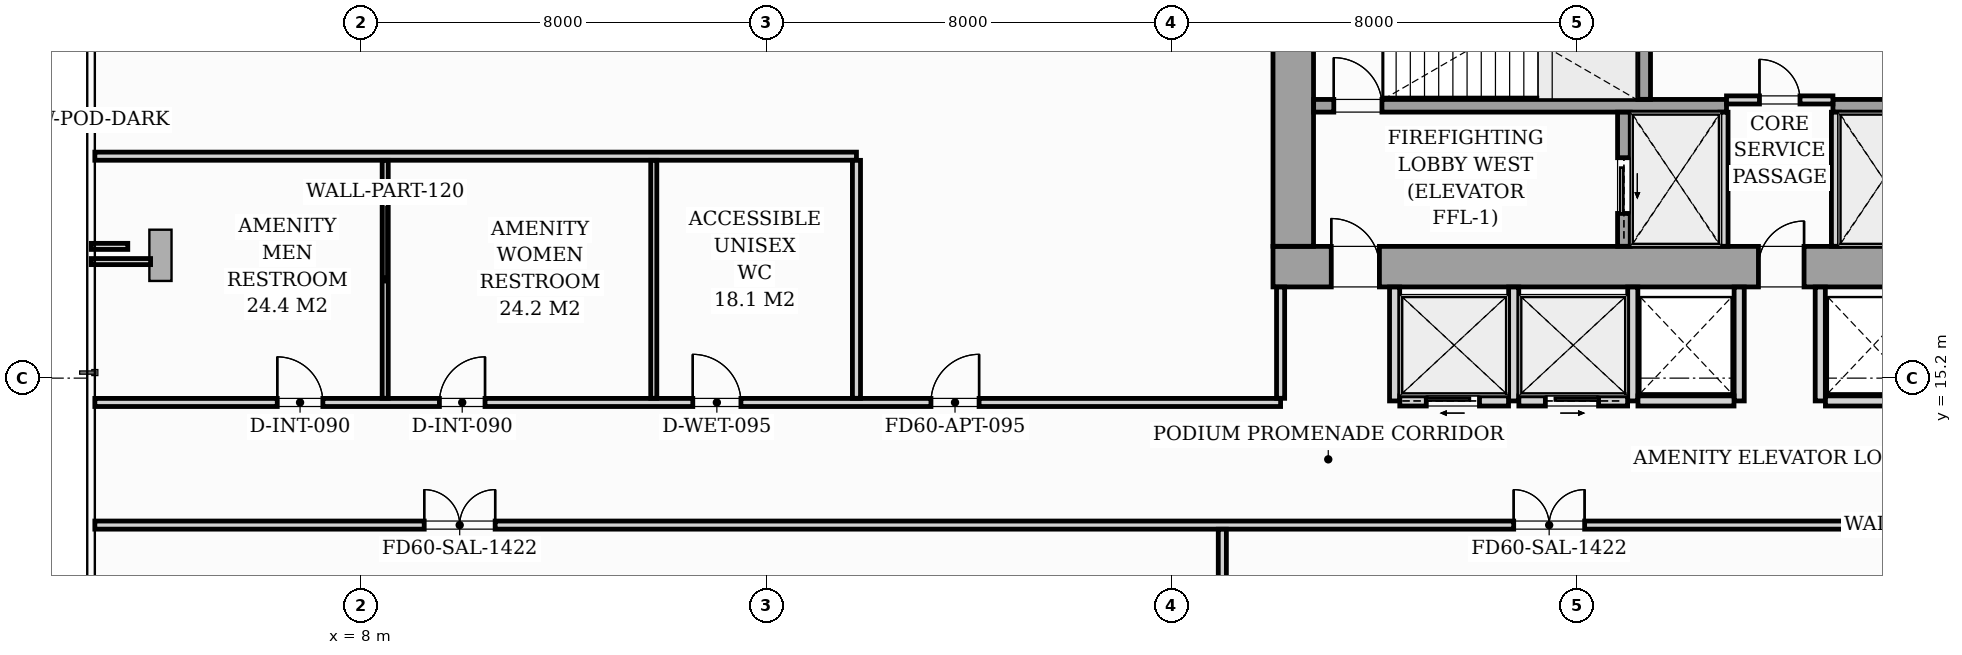
"""IFC4 building model, lengths in metres.
Left out: names, types, materials, properties, quantities, classifications, styles, units other than length and angle.
Written with IfcOpenShell. Run it as: python <this file> out.ifc"""

import sys

from ifc_helpers import new_model, si_unit, direction, frame, frame_2d, origin, origin_2d, place, context, subcontext, project, spatial, rectangle, i_section, extrude, source, transform, mapped, element, fill, save


model = new_model("IFC4")
c1 = context("Model", 3, precision=1e-05, world=origin(), true_north=direction((0.0, 1.0)))
c2 = subcontext(c1, "Body", "Model", "MODEL_VIEW")
j1 = project(units=[si_unit("LENGTHUNIT", "METRE"), si_unit("PLANEANGLEUNIT", "RADIAN")], contexts=[c1])
p1 = place(None, origin())
s1 = spatial("IfcSite", under=j1, at=p1, CompositionType="ELEMENT")
p2 = place(p1, origin())
s2 = spatial("IfcBuilding", under=s1, at=p2, CompositionType="ELEMENT")
p3 = place(p2, frame((0.0, 0.0, 9.5)))
s3 = spatial("IfcBuildingStorey", under=s2, at=p3, CompositionType="ELEMENT", Elevation=9.5)
m1 = source(origin(), c2, "Body", "SweptSolid", [
    extrude(i_section(OverallWidth=0.437, OverallDepth=0.514, WebThickness=0.061, FlangeThickness=0.097, FilletRadius=0.018, at=origin_2d()), origin(), (0.0, 0.0, 1.0), 4.496),
])
for number, where, z_axis, x_axis in (
    (1, (26.4, 17.4, 0.002), (0.0, 0.0, 1.0), (1.0, 0.0, 0.0)),
    (2, (33.12, 17.4, 0.002), (0.0, 0.0, 1.0), (1.0, 0.0, 0.0)),
):
    element("IfcColumn", number, at=place(p3, frame(where, z_axis=z_axis, x_axis=x_axis)), inside=s3, PredefinedType="PILASTER", context=c2, shape_type="MappedRepresentation", body=[
        mapped(m1, transform((0.0, 0.0, 0.0), scale=1.0)),
    ])
m2 = source(origin(), c2, "Body", "SweptSolid", [
    extrude(i_section(OverallWidth=0.438, OverallDepth=1.011, WebThickness=0.041, FlangeThickness=0.074, FilletRadius=0.024, at=origin_2d()), origin(), (0.0, 0.0, 1.0), 4.08),
])
p4 = place(p3, frame((3.795, 17.79, 0.068), z_axis=(0.213256785591, -0.142171190394, 0.966596552871), x_axis=(-0.804256946322, 0.536171297548, 0.256302758429)))
e3 = element("IfcColumn", 3, at=p4, inside=s3, PredefinedType="COLUMN", context=c2, shape_type="MappedRepresentation", body=[
    mapped(m2, transform((0.0, 0.0, 0.0), scale=1.0)),
])
p5 = place(p3, frame((26.0, 17.4, 0.0), z_axis=(0.0, 0.0, 1.0), x_axis=(1.0, 0.0, 0.0)))
e4 = element("IfcWall", 4, at=p5, inside=s3, PredefinedType="SHEAR", context=c2, shape_type="SweptSolid", body=[
    extrude(rectangle(XDim=20.0, YDim=0.8, at=frame_2d((10.0, 0.0))), origin(), (0.0, 0.0, 1.0), 4.5),
])
p6 = place(p5, frame((1.15, 0.0, 0.0)))
e5 = element("IfcOpeningElement", 5, at=p6, cuts=e4, PredefinedType="OPENING", context=c2, shape_type="SweptSolid", body=[
    extrude(rectangle(XDim=0.95, YDim=2.06, at=frame_2d((0.475, 1.03))), frame((0.0, 0.41, 0.0), z_axis=(0.0, -1.0, 0.0), x_axis=(1.0, 0.0, 0.0)), (0.0, 0.0, 1.0), 0.82),
])
p7 = place(p5, frame((9.58, 0.0, 0.0)))
e6 = element("IfcOpeningElement", 6, at=p7, cuts=e4, PredefinedType="OPENING", context=c2, shape_type="SweptSolid", body=[
    extrude(rectangle(XDim=0.9, YDim=2.06, at=frame_2d((0.45, 1.03))), frame((0.0, 0.41, 0.0), z_axis=(0.0, -1.0, 0.0), x_axis=(1.0, 0.0, 0.0)), (0.0, 0.0, 1.0), 0.82),
])
p8 = place(p5, frame((17.75, 0.0, 0.0)))
e7 = element("IfcOpeningElement", 7, at=p8, cuts=e4, PredefinedType="OPENING", context=c2, shape_type="SweptSolid", body=[
    extrude(rectangle(XDim=0.95, YDim=2.06, at=frame_2d((0.475, 1.03))), frame((0.0, 0.41, 0.0), z_axis=(0.0, -1.0, 0.0), x_axis=(1.0, 0.0, 0.0)), (0.0, 0.0, 1.0), 0.82),
])
p9 = place(p3, frame((26.4, 17.802, 0.0), z_axis=(0.0, 0.0, 1.0), x_axis=(0.0, 1.0, 0.0)))
e8 = element("IfcWall", 8, at=p9, inside=s3, PredefinedType="SHEAR", context=c2, shape_type="SweptSolid", body=[
    extrude(rectangle(XDim=5.796, YDim=0.8, at=frame_2d((2.898, 0.0))), origin(), (0.0, 0.0, 1.0), 4.5),
])
p10 = place(p3, frame((26.802, 20.575, 0.0), z_axis=(0.0, 0.0, 1.0), x_axis=(1.0, 0.0, 0.0)))
e9 = element("IfcWall", 9, at=p10, inside=s3, PredefinedType="SOLIDWALL", context=c2, shape_type="SweptSolid", body=[
    extrude(rectangle(XDim=8.148, YDim=0.25, at=frame_2d((4.074, 0.0))), origin(), (0.0, 0.0, 1.0), 4.5),
])
p11 = place(p10, frame((0.398, 0.0, 0.0)))
e10 = element("IfcOpeningElement", 10, at=p11, cuts=e9, PredefinedType="OPENING", context=c2, shape_type="SweptSolid", body=[
    extrude(rectangle(XDim=0.95, YDim=2.06, at=frame_2d((0.475, 1.03))), frame((0.0, 0.135, 0.0), z_axis=(0.0, -1.0, 0.0), x_axis=(1.0, 0.0, 0.0)), (0.0, 0.0, 1.0), 0.27),
])
p12 = place(p3, frame((37.05, 20.575, 0.0), z_axis=(0.0, 0.0, 1.0), x_axis=(1.0, 0.0, 0.0)))
e11 = element("IfcWall", 11, at=p12, inside=s3, PredefinedType="SOLIDWALL", context=c2, shape_type="SweptSolid", body=[
    extrude(rectangle(XDim=8.148, YDim=0.25, at=frame_2d((4.074, 0.0))), origin(), (0.0, 0.0, 1.0), 4.5),
])
p13 = place(p12, frame((6.6, 0.0, 0.0)))
e12 = element("IfcOpeningElement", 12, at=p13, cuts=e11, PredefinedType="OPENING", context=c2, shape_type="SweptSolid", body=[
    extrude(rectangle(XDim=0.95, YDim=2.06, at=frame_2d((0.475, 1.03))), frame((0.0, 0.135, 0.0), z_axis=(0.0, -1.0, 0.0), x_axis=(1.0, 0.0, 0.0)), (0.0, 0.0, 1.0), 0.27),
])
p14 = place(p3, frame((33.325, 20.702, 0.0), z_axis=(0.0, 0.0, 1.0), x_axis=(0.0, 1.0, 0.0)))
e13 = element("IfcWall", 13, at=p14, inside=s3, PredefinedType="SOLIDWALL", context=c2, shape_type="SweptSolid", body=[
    extrude(rectangle(XDim=2.896, YDim=0.25, at=frame_2d((1.448, 0.0))), origin(), (0.0, 0.0, 1.0), 4.5),
])
p15 = place(p3, frame((32.925, 17.802, 0.0), z_axis=(0.0, 0.0, 1.0), x_axis=(0.0, 1.0, 0.0)))
e14 = element("IfcWall", 14, at=p15, inside=s3, PredefinedType="SOLIDWALL", context=c2, shape_type="SweptSolid", body=[
    extrude(rectangle(XDim=2.646, YDim=0.25, at=frame_2d((1.323, 0.0))), origin(), (0.0, 0.0, 1.0), 4.5),
])
p16 = place(p15, frame((0.648, 0.0, 0.0)))
e15 = element("IfcOpeningElement", 15, at=p16, cuts=e14, PredefinedType="OPENING", context=c2, shape_type="SweptSolid", body=[
    extrude(rectangle(XDim=1.1, YDim=2.08, at=frame_2d((0.55, 1.04))), frame((0.0, 0.135, 0.0), z_axis=(0.0, -1.0, 0.0), x_axis=(1.0, 0.0, 0.0)), (0.0, 0.0, 1.0), 0.27),
])
for number, where, z_axis, x_axis in (
    (16, (34.9, 17.802, 0.0), (0.0, 0.0, 1.0), (0.0, 1.0, 0.0)),
    (17, (37.1, 17.802, 0.0), (0.0, 0.0, 1.0), (0.0, 1.0, 0.0)),
):
    element("IfcWall", number, at=place(p3, frame(where, z_axis=z_axis, x_axis=x_axis)), inside=s3, PredefinedType="PARTITIONING", context=c2, shape_type="SweptSolid", body=[
        extrude(rectangle(XDim=2.646, YDim=0.16, at=frame_2d((1.323, 0.0))), origin(), (0.0, 0.0, 1.0), 4.08),
    ])
p17 = place(p3, frame((34.95, 20.69, 0.0), z_axis=(0.0, 0.0, 1.0), x_axis=(1.0, 0.0, 0.0)))
e18 = element("IfcWall", 18, at=p17, inside=s3, PredefinedType="PARTITIONING", context=c2, shape_type="SweptSolid", body=[
    extrude(rectangle(XDim=2.1, YDim=0.16, at=frame_2d((1.05, 0.0))), origin(), (0.0, 0.0, 1.0), 4.08),
])
p18 = place(p17, frame((0.65, 0.0, 0.0)))
e19 = element("IfcOpeningElement", 19, at=p18, cuts=e18, PredefinedType="OPENING", context=c2, shape_type="SweptSolid", body=[
    extrude(rectangle(XDim=0.8, YDim=2.05, at=frame_2d((0.4, 1.025))), frame((0.0, 0.09, 0.0), z_axis=(0.0, -1.0, 0.0), x_axis=(1.0, 0.0, 0.0)), (0.0, 0.0, 1.0), 0.18),
])
for number, where, z_axis, x_axis in (
    (20, (28.4, 14.75, 0.0), (0.0, 0.0, 1.0), (0.0, 1.0, 0.0)),
    (21, (30.75, 14.75, 0.0), (0.0, 0.0, 1.0), (0.0, 1.0, 0.0)),
    (22, (33.1, 14.75, 0.0), (0.0, 0.0, 1.0), (0.0, 1.0, 0.0)),
):
    element("IfcWall", number, at=place(p3, frame(where, z_axis=z_axis, x_axis=x_axis)), inside=s3, PredefinedType="PARTITIONING", context=c2, shape_type="SweptSolid", body=[
        extrude(rectangle(XDim=2.248, YDim=0.2, at=frame_2d((1.124, 0.0))), origin(), (0.0, 0.0, 1.0), 4.08),
    ])
p19 = place(p3, frame((28.502, 14.75, 0.0), z_axis=(0.0, 0.0, 1.0), x_axis=(1.0, 0.0, 0.0)))
e23 = element("IfcWall", 23, at=p19, inside=s3, PredefinedType="PARTITIONING", context=c2, shape_type="SweptSolid", body=[
    extrude(rectangle(XDim=2.146, YDim=0.2, at=frame_2d((1.073, 0.0))), origin(), (0.0, 0.0, 1.0), 4.08),
])
p20 = place(p19, frame((0.523, 0.0, 0.0)))
e24 = element("IfcOpeningElement", 24, at=p20, cuts=e23, PredefinedType="OPENING", context=c2, shape_type="SweptSolid", body=[
    extrude(rectangle(XDim=1.05, YDim=2.08, at=frame_2d((0.525, 1.04))), frame((0.0, 0.11, 0.0), z_axis=(0.0, -1.0, 0.0), x_axis=(1.0, 0.0, 0.0)), (0.0, 0.0, 1.0), 0.22),
])
p21 = place(p3, frame((30.852, 14.75, 0.0), z_axis=(0.0, 0.0, 1.0), x_axis=(1.0, 0.0, 0.0)))
e25 = element("IfcWall", 25, at=p21, inside=s3, PredefinedType="PARTITIONING", context=c2, shape_type="SweptSolid", body=[
    extrude(rectangle(XDim=2.146, YDim=0.2, at=frame_2d((1.073, 0.0))), origin(), (0.0, 0.0, 1.0), 4.08),
])
p22 = place(p21, frame((0.523, 0.0, 0.0)))
e26 = element("IfcOpeningElement", 26, at=p22, cuts=e25, PredefinedType="OPENING", context=c2, shape_type="SweptSolid", body=[
    extrude(rectangle(XDim=1.05, YDim=2.08, at=frame_2d((0.525, 1.04))), frame((0.0, 0.11, 0.0), z_axis=(0.0, -1.0, 0.0), x_axis=(1.0, 0.0, 0.0)), (0.0, 0.0, 1.0), 0.22),
])
p23 = place(p3, frame((35.2, 14.75, 0.0), z_axis=(0.0, 0.0, 1.0), x_axis=(0.0, 1.0, 0.0)))
e27 = element("IfcWall", 27, at=p23, inside=s3, PredefinedType="PARTITIONING", context=c2, shape_type="SweptSolid", body=[
    extrude(rectangle(XDim=2.248, YDim=0.2, at=frame_2d((1.124, 0.0))), origin(), (0.0, 0.0, 1.0), 4.08),
])
p24 = place(p3, frame((33.202, 14.75, 0.0), z_axis=(0.0, 0.0, 1.0), x_axis=(1.0, 0.0, 0.0)))
e28 = element("IfcWall", 28, at=p24, inside=s3, PredefinedType="PARTITIONING", context=c2, shape_type="SweptSolid", body=[
    extrude(rectangle(XDim=1.896, YDim=0.2, at=frame_2d((0.948, 0.0))), origin(), (0.0, 0.0, 1.0), 4.08),
])
p25 = place(p3, frame((36.8, 14.75, 0.0), z_axis=(0.0, 0.0, 1.0), x_axis=(0.0, 1.0, 0.0)))
e29 = element("IfcWall", 29, at=p25, inside=s3, PredefinedType="PARTITIONING", context=c2, shape_type="SweptSolid", body=[
    extrude(rectangle(XDim=2.248, YDim=0.2, at=frame_2d((1.124, 0.0))), origin(), (0.0, 0.0, 1.0), 4.08),
])
p26 = place(p3, frame((36.902, 14.75, 0.0), z_axis=(0.0, 0.0, 1.0), x_axis=(1.0, 0.0, 0.0)))
e30 = element("IfcWall", 30, at=p26, inside=s3, PredefinedType="PARTITIONING", context=c2, shape_type="SweptSolid", body=[
    extrude(rectangle(XDim=1.896, YDim=0.2, at=frame_2d((0.948, 0.0))), origin(), (0.0, 0.0, 1.0), 4.08),
])
p27 = place(p3, frame((2.75, 12.3, 0.0), z_axis=(0.0, 0.0, 1.0), x_axis=(1.0, 0.0, 0.0)))
e31 = element("IfcWall", 31, at=p27, inside=s3, PredefinedType="PARTITIONING", context=c2, shape_type="SweptSolid", body=[
    extrude(rectangle(XDim=72.348, YDim=0.16, at=frame_2d((36.174, 0.0))), origin(), (0.0, 0.0, 1.0), 4.08),
])
p28 = place(p27, frame((6.5, 0.0, 0.0)))
e32 = element("IfcOpeningElement", 32, at=p28, cuts=e31, PredefinedType="OPENING", context=c2, shape_type="SweptSolid", body=[
    extrude(rectangle(XDim=1.4, YDim=2.08, at=frame_2d((0.7, 1.04))), frame((0.0, 0.09, 0.0), z_axis=(0.0, -1.0, 0.0), x_axis=(1.0, 0.0, 0.0)), (0.0, 0.0, 1.0), 0.18),
])
p29 = place(p27, frame((28.0, 0.0, 0.0)))
e33 = element("IfcOpeningElement", 33, at=p29, cuts=e31, PredefinedType="OPENING", context=c2, shape_type="SweptSolid", body=[
    extrude(rectangle(XDim=1.4, YDim=2.08, at=frame_2d((0.7, 1.04))), frame((0.0, 0.09, 0.0), z_axis=(0.0, -1.0, 0.0), x_axis=(1.0, 0.0, 0.0)), (0.0, 0.0, 1.0), 0.18),
])
p30 = place(p3, frame((2.75, 14.72, 0.0), z_axis=(0.0, 0.0, 1.0), x_axis=(1.0, 0.0, 0.0)))
e34 = element("IfcWall", 34, at=p30, inside=s3, PredefinedType="PARTITIONING", context=c2, shape_type="SweptSolid", body=[
    extrude(rectangle(XDim=23.4, YDim=0.16, at=frame_2d((11.7, 0.0))), origin(), (0.0, 0.0, 1.0), 4.08),
])
p31 = place(p30, frame((16.5, 0.0, 0.0)))
e35 = element("IfcOpeningElement", 35, at=p31, cuts=e34, PredefinedType="OPENING", context=c2, shape_type="SweptSolid", body=[
    extrude(rectangle(XDim=0.95, YDim=2.06, at=frame_2d((0.475, 1.03))), frame((0.0, 0.09, 0.0), z_axis=(0.0, -1.0, 0.0), x_axis=(1.0, 0.0, 0.0)), (0.0, 0.0, 1.0), 0.18),
])
p32 = place(p30, frame((3.6, 0.0, 0.0)))
e36 = element("IfcOpeningElement", 36, at=p32, cuts=e34, PredefinedType="OPENING", context=c2, shape_type="SweptSolid", body=[
    extrude(rectangle(XDim=0.9, YDim=2.05, at=frame_2d((0.45, 1.025))), frame((0.0, 0.09, 0.0), z_axis=(0.0, -1.0, 0.0), x_axis=(1.0, 0.0, 0.0)), (0.0, 0.0, 1.0), 0.18),
])
p33 = place(p30, frame((6.8, 0.0, 0.0)))
e37 = element("IfcOpeningElement", 37, at=p33, cuts=e34, PredefinedType="OPENING", context=c2, shape_type="SweptSolid", body=[
    extrude(rectangle(XDim=0.9, YDim=2.05, at=frame_2d((0.45, 1.025))), frame((0.0, 0.09, 0.0), z_axis=(0.0, -1.0, 0.0), x_axis=(1.0, 0.0, 0.0)), (0.0, 0.0, 1.0), 0.18),
])
p34 = place(p30, frame((11.8, 0.0, 0.0)))
e38 = element("IfcOpeningElement", 38, at=p34, cuts=e34, PredefinedType="OPENING", context=c2, shape_type="SweptSolid", body=[
    extrude(rectangle(XDim=0.95, YDim=2.1, at=frame_2d((0.475, 1.05))), frame((0.0, 0.09, 0.0), z_axis=(0.0, -1.0, 0.0), x_axis=(1.0, 0.0, 0.0)), (0.0, 0.0, 1.0), 0.18),
])
p35 = place(p3, frame((25.0, 1.35, 0.0), z_axis=(0.0, 0.0, 1.0), x_axis=(0.0, 1.0, 0.0)))
e39 = element("IfcWall", 39, at=p35, inside=s3, PredefinedType="PARTITIONING", context=c2, shape_type="SweptSolid", body=[
    extrude(rectangle(XDim=10.868, YDim=0.16, at=frame_2d((5.434, 0.0))), origin(), (0.0, 0.0, 1.0), 4.08),
])
p36 = place(p3, frame((2.75, 19.58, 0.0), z_axis=(0.0, 0.0, 1.0), x_axis=(1.0, 0.0, 0.0)))
e40 = element("IfcWall", 40, at=p36, inside=s3, PredefinedType="PARTITIONING", context=c2, shape_type="SweptSolid", body=[
    extrude(rectangle(XDim=15.03, YDim=0.16, at=frame_2d((7.515, 0.0))), origin(), (0.0, 0.0, 1.0), 4.08),
])
for number, where, z_axis, x_axis in (
    (41, (8.48, 14.802, 0.0), (0.0, 0.0, 1.0), (0.0, 1.0, 0.0)),
    (42, (13.78, 14.802, 0.0), (0.0, 0.0, 1.0), (0.0, 1.0, 0.0)),
):
    element("IfcWall", number, at=place(p3, frame(where, z_axis=z_axis, x_axis=x_axis)), inside=s3, PredefinedType="PARTITIONING", context=c2, shape_type="SweptSolid", body=[
        extrude(rectangle(XDim=4.696, YDim=0.12, at=frame_2d((2.348, 0.0))), origin(), (0.0, 0.0, 1.0), 4.08),
    ])
p37 = place(p3, frame((17.78, 14.802, 0.0), z_axis=(0.0, 0.0, 1.0), x_axis=(0.0, 1.0, 0.0)))
e43 = element("IfcWall", 43, at=p37, inside=s3, PredefinedType="PARTITIONING", context=c2, shape_type="SweptSolid", body=[
    extrude(rectangle(XDim=4.696, YDim=0.16, at=frame_2d((2.348, 0.0))), origin(), (0.0, 0.0, 1.0), 4.08),
])
p38 = place(p3, frame((26.15, 14.802, 0.0), z_axis=(0.0, 0.0, 1.0), x_axis=(0.0, 1.0, 0.0)))
e44 = element("IfcWall", 44, at=p38, inside=s3, PredefinedType="PARTITIONING", context=c2, shape_type="SweptSolid", body=[
    extrude(rectangle(XDim=2.196, YDim=0.16, at=frame_2d((1.098, 0.0))), origin(), (0.0, 0.0, 1.0), 4.08),
])
p39 = place(p3, frame((3.85, 17.5, 0.0), z_axis=(0.0, 0.0, 1.0), x_axis=(-1.0, 0.0, 0.0)))
e45 = element("IfcWall", 45, at=p39, inside=s3, PredefinedType="PARTITIONING", context=c2, shape_type="SweptSolid", body=[
    extrude(rectangle(XDim=1.17, YDim=0.12, at=frame_2d((0.585, 0.0))), origin(), (0.0, 0.0, 1.0), 4.08),
])
p40 = place(p3, frame((3.4, 17.8, 0.0), z_axis=(0.0, 0.0, 1.0), x_axis=(-1.0, 0.0, 0.0)))
e46 = element("IfcWall", 46, at=p40, inside=s3, PredefinedType="PARTITIONING", context=c2, shape_type="SweptSolid", body=[
    extrude(rectangle(XDim=0.72, YDim=0.12, at=frame_2d((0.36, 0.0))), origin(), (0.0, 0.0, 1.0), 4.08),
])
m3 = source(origin(), c2, "Body", "SweptSolid", [
    extrude(rectangle(XDim=0.95, YDim=2.06, at=frame_2d((0.475, 1.03))), frame((0.0, 0.025, 0.0), z_axis=(0.0, -1.0, 0.0), x_axis=(1.0, 0.0, 0.0)), (0.0, 0.0, 1.0), 0.05),
])
p41 = place(p6, origin())
e47 = element("IfcDoor", 47, at=p41, inside=s3, OperationType="SINGLE_SWING_LEFT", PredefinedType="DOOR", context=c2, shape_type="MappedRepresentation", body=[
    mapped(m3, transform((0.0, 0.0, 0.0), scale=1.0)),
])
fill(e5, e47)
m4 = source(origin(), c2, "Body", "SweptSolid", [
    extrude(rectangle(XDim=0.9, YDim=2.06, at=frame_2d((0.45, 1.03))), frame((0.0, 0.025, 0.0), z_axis=(0.0, -1.0, 0.0), x_axis=(1.0, 0.0, 0.0)), (0.0, 0.0, 1.0), 0.05),
])
p42 = place(p7, origin())
e48 = element("IfcDoor", 48, at=p42, inside=s3, OperationType="SINGLE_SWING_RIGHT", PredefinedType="DOOR", context=c2, shape_type="MappedRepresentation", body=[
    mapped(m4, transform((0.0, 0.0, 0.0), scale=1.0)),
])
fill(e6, e48)
p43 = place(p11, origin())
e49 = element("IfcDoor", 49, at=p43, inside=s3, OperationType="SINGLE_SWING_LEFT", PredefinedType="DOOR", context=c2, shape_type="MappedRepresentation", body=[
    mapped(m3, transform((0.0, 0.0, 0.0), scale=1.0)),
])
fill(e10, e49)
m5 = source(origin(), c2, "Body", "SweptSolid", [
    extrude(rectangle(XDim=1.1, YDim=2.08, at=frame_2d((0.55, 1.04))), frame((0.0, 0.025, 0.0), z_axis=(0.0, -1.0, 0.0), x_axis=(1.0, 0.0, 0.0)), (0.0, 0.0, 1.0), 0.05),
])
p44 = place(p16, origin())
e50 = element("IfcDoor", 50, at=p44, inside=s3, OperationType="SLIDING_TO_LEFT", PredefinedType="DOOR", context=c2, shape_type="MappedRepresentation", body=[
    mapped(m5, transform((0.0, 0.0, 0.0), scale=1.0)),
])
fill(e15, e50)
m6 = source(origin(), c2, "Body", "SweptSolid", [
    extrude(rectangle(XDim=0.8, YDim=2.05, at=frame_2d((0.4, 1.025))), frame((0.0, 0.025, 0.0), z_axis=(0.0, -1.0, 0.0), x_axis=(1.0, 0.0, 0.0)), (0.0, 0.0, 1.0), 0.05),
])
p45 = place(p18, origin())
e51 = element("IfcDoor", 51, at=p45, inside=s3, OperationType="SINGLE_SWING_LEFT", PredefinedType="DOOR", context=c2, shape_type="MappedRepresentation", body=[
    mapped(m6, transform((0.0, 0.0, 0.0), scale=1.0)),
])
fill(e19, e51)
m7 = source(origin(), c2, "Body", "SweptSolid", [
    extrude(rectangle(XDim=1.05, YDim=2.08, at=frame_2d((0.525, 1.04))), frame((0.0, 0.025, 0.0), z_axis=(0.0, -1.0, 0.0), x_axis=(1.0, 0.0, 0.0)), (0.0, 0.0, 1.0), 0.05),
])
p46 = place(p20, origin())
e52 = element("IfcDoor", 52, at=p46, inside=s3, OperationType="SLIDING_TO_LEFT", PredefinedType="DOOR", context=c2, shape_type="MappedRepresentation", body=[
    mapped(m7, transform((0.0, 0.0, 0.0), scale=1.0)),
])
fill(e24, e52)
p47 = place(p22, origin())
e53 = element("IfcDoor", 53, at=p47, inside=s3, OperationType="SLIDING_TO_RIGHT", PredefinedType="DOOR", context=c2, shape_type="MappedRepresentation", body=[
    mapped(m7, transform((0.0, 0.0, 0.0), scale=1.0)),
])
fill(e26, e53)
m8 = source(origin(), c2, "Body", "SweptSolid", [
    extrude(rectangle(XDim=1.4, YDim=2.08, at=frame_2d((0.7, 1.04))), frame((0.0, 0.025, 0.0), z_axis=(0.0, -1.0, 0.0), x_axis=(1.0, 0.0, 0.0)), (0.0, 0.0, 1.0), 0.05),
])
p48 = place(p28, origin())
e54 = element("IfcDoor", 54, at=p48, inside=s3, OperationType="DOUBLE_DOOR_SINGLE_SWING", PredefinedType="DOOR", context=c2, shape_type="MappedRepresentation", body=[
    mapped(m8, transform((0.0, 0.0, 0.0), scale=1.0)),
])
fill(e32, e54)
p49 = place(p29, origin())
e55 = element("IfcDoor", 55, at=p49, inside=s3, OperationType="DOUBLE_DOOR_SINGLE_SWING", PredefinedType="DOOR", context=c2, shape_type="MappedRepresentation", body=[
    mapped(m8, transform((0.0, 0.0, 0.0), scale=1.0)),
])
fill(e33, e55)
m9 = source(origin(), c2, "Body", "SweptSolid", [
    extrude(rectangle(XDim=0.95, YDim=2.06, at=frame_2d((0.475, 1.03))), frame((0.0, 0.025, 0.0), z_axis=(0.0, -1.0, 0.0), x_axis=(1.0, 0.0, 0.0)), (0.0, 0.0, 1.0), 0.05),
])
p50 = place(p31, origin())
e56 = element("IfcDoor", 56, at=p50, inside=s3, OperationType="SINGLE_SWING_RIGHT", PredefinedType="DOOR", context=c2, shape_type="MappedRepresentation", body=[
    mapped(m9, transform((0.0, 0.0, 0.0), scale=1.0)),
])
fill(e35, e56)
m10 = source(origin(), c2, "Body", "SweptSolid", [
    extrude(rectangle(XDim=0.9, YDim=2.05, at=frame_2d((0.45, 1.025))), frame((0.0, 0.025, 0.0), z_axis=(0.0, -1.0, 0.0), x_axis=(1.0, 0.0, 0.0)), (0.0, 0.0, 1.0), 0.05),
])
p51 = place(p32, origin())
e57 = element("IfcDoor", 57, at=p51, inside=s3, OperationType="SINGLE_SWING_LEFT", PredefinedType="DOOR", context=c2, shape_type="MappedRepresentation", body=[
    mapped(m10, transform((0.0, 0.0, 0.0), scale=1.0)),
])
fill(e36, e57)
p52 = place(p33, origin())
e58 = element("IfcDoor", 58, at=p52, inside=s3, OperationType="SINGLE_SWING_RIGHT", PredefinedType="DOOR", context=c2, shape_type="MappedRepresentation", body=[
    mapped(m10, transform((0.0, 0.0, 0.0), scale=1.0)),
])
fill(e37, e58)
m11 = source(origin(), c2, "Body", "SweptSolid", [
    extrude(rectangle(XDim=0.95, YDim=2.1, at=frame_2d((0.475, 1.05))), frame((0.0, 0.025, 0.0), z_axis=(0.0, -1.0, 0.0), x_axis=(1.0, 0.0, 0.0)), (0.0, 0.0, 1.0), 0.05),
])
p53 = place(p34, origin())
e59 = element("IfcDoor", 59, at=p53, inside=s3, OperationType="SINGLE_SWING_LEFT", PredefinedType="DOOR", context=c2, shape_type="MappedRepresentation", body=[
    mapped(m11, transform((0.0, 0.0, 0.0), scale=1.0)),
])
fill(e38, e59)
save(model, sys.argv[1])
